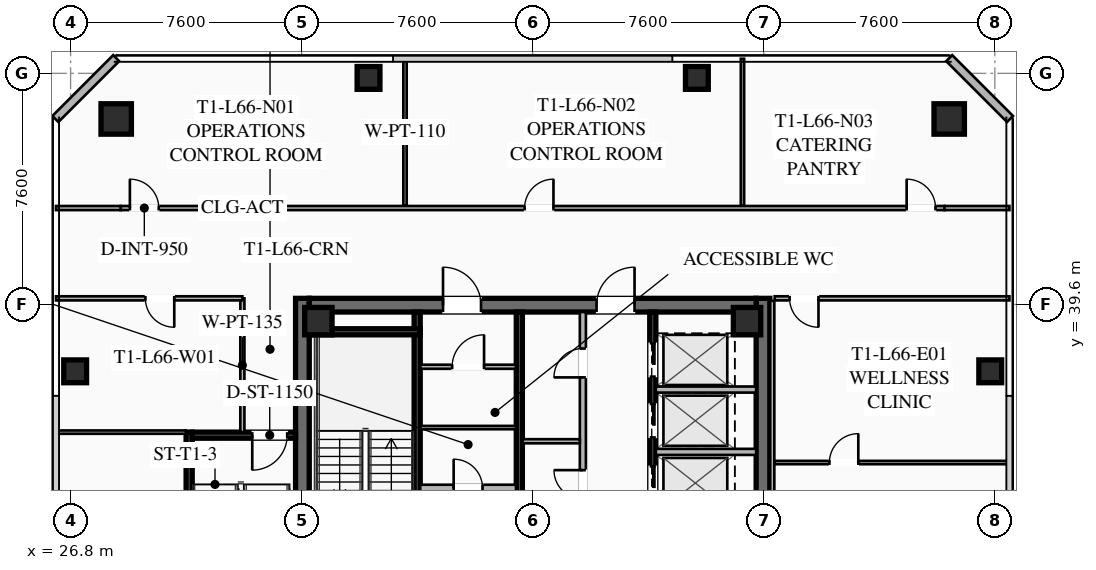
"""IFC4 building model, lengths in metres.
Left out: names, types, materials, properties, quantities, classifications, styles, units other than length and angle.
Written with IfcOpenShell. Run it as: python <this file> out.ifc"""

import sys

from ifc_helpers import new_model, si_unit, direction, frame, frame_2d, origin, origin_2d, place, context, subcontext, project, spatial, rectangle, hollow_rectangle, extrude, element, fill, save


model = new_model("IFC4")
c1 = context("Model", 3, precision=1e-05, world=origin(), true_north=direction((0.0, 1.0)))
c2 = subcontext(c1, "Body", "Model", "MODEL_VIEW")
j1 = project(units=[si_unit("LENGTHUNIT", "METRE"), si_unit("PLANEANGLEUNIT", "RADIAN")], contexts=[c1])
p1 = place(None, origin())
s1 = spatial("IfcSite", under=j1, at=p1, CompositionType="ELEMENT")
p2 = place(p1, origin())
s2 = spatial("IfcBuilding", under=s1, at=p2, CompositionType="ELEMENT")
p3 = place(p2, frame((0.0, 0.0, 243.25)))
s3 = spatial("IfcBuildingStorey", under=s2, at=p3, CompositionType="ELEMENT", Elevation=243.25)
for number, where, z_axis, x_axis in (
    (1, (34.425, 24.2, 0.0), (0.0, 0.0, 1.0), (0.0, 1.0, 0.0)),
    (2, (49.575, 39.8, 0.0), (0.0, 0.0, 1.0), (0.0, -1.0, 0.0)),
):
    element("IfcWall", number, at=place(p3, frame(where, z_axis=z_axis, x_axis=x_axis)), inside=s3, PredefinedType="SHEAR", context=c2, shape_type="SweptSolid", body=[
        extrude(rectangle(XDim=15.6, YDim=0.45, at=frame_2d((7.8, 0.0))), origin(), (0.0, 0.0, 1.0), 3.55),
    ])
p4 = place(p3, frame((34.65, 39.575, 0.0), z_axis=(0.0, 0.0, 1.0), x_axis=(1.0, 0.0, 0.0)))
e3 = element("IfcWall", 3, at=p4, inside=s3, PredefinedType="SHEAR", context=c2, shape_type="SweptSolid", body=[
    extrude(rectangle(XDim=14.7, YDim=0.45, at=frame_2d((7.35, 0.0))), origin(), (0.0, 0.0, 1.0), 3.55),
])
p5 = place(p4, frame((4.4, 0.0, 0.0)))
e4 = element("IfcOpeningElement", 4, at=p5, cuts=e3, PredefinedType="OPENING", context=c2, shape_type="SweptSolid", body=[
    extrude(rectangle(XDim=1.25, YDim=2.25, at=frame_2d((0.625, 1.125))), frame((0.0, 0.235, 0.0), z_axis=(0.0, -1.0, 0.0), x_axis=(1.0, 0.0, 0.0)), (0.0, 0.0, 1.0), 0.47),
])
p6 = place(p4, frame((9.45, 0.0, 0.0)))
e5 = element("IfcOpeningElement", 5, at=p6, cuts=e3, PredefinedType="OPENING", context=c2, shape_type="SweptSolid", body=[
    extrude(rectangle(XDim=1.25, YDim=2.25, at=frame_2d((0.625, 1.125))), frame((0.0, 0.235, 0.0), z_axis=(0.0, -1.0, 0.0), x_axis=(1.0, 0.0, 0.0)), (0.0, 0.0, 1.0), 0.47),
])
for number, where, z_axis, x_axis in (
    (6, (49.05, 39.05, 0.0), (0.0, 0.0, 1.0), (1.0, 0.0, 0.0)),
    (7, (34.95, 39.05, 0.0), (0.0, 0.0, 1.0), (1.0, 0.0, 0.0)),
):
    element("IfcColumn", number, at=place(p3, frame(where, z_axis=z_axis, x_axis=x_axis)), inside=s3, PredefinedType="COLUMN", context=c2, shape_type="SweptSolid", body=[
        extrude(hollow_rectangle(XDim=0.9, YDim=0.9, WallThickness=0.04, at=origin_2d()), origin(), (0.0, 0.0, 1.0), 3.25),
    ])
for number, where, z_axis, x_axis in (
    (8, (55.7, 45.7, 0.0), (0.0, 0.0, 1.0), (1.0, 0.0, 0.0)),
    (9, (28.3, 45.7, 0.0), (0.0, 0.0, 1.0), (1.0, 0.0, 0.0)),
):
    element("IfcColumn", number, at=place(p3, frame(where, z_axis=z_axis, x_axis=x_axis)), inside=s3, PredefinedType="COLUMN", context=c2, shape_type="SweptSolid", body=[
        extrude(hollow_rectangle(XDim=1.0, YDim=1.0, WallThickness=0.04, at=origin_2d()), origin(), (0.0, 0.0, 1.0), 3.25),
    ])
for number, where, z_axis, x_axis in (
    (10, (57.05, 37.4, 0.0), (0.0, 0.0, 1.0), (1.0, 0.0, 0.0)),
    (11, (47.4, 47.05, 0.0), (0.0, 0.0, 1.0), (1.0, 0.0, 0.0)),
    (12, (36.6, 47.05, 0.0), (0.0, 0.0, 1.0), (1.0, 0.0, 0.0)),
    (13, (26.95, 37.4, 0.0), (0.0, 0.0, 1.0), (1.0, 0.0, 0.0)),
):
    element("IfcColumn", number, at=place(p3, frame(where, z_axis=z_axis, x_axis=x_axis)), inside=s3, PredefinedType="COLUMN", context=c2, shape_type="SweptSolid", body=[
        extrude(hollow_rectangle(XDim=0.75, YDim=0.75, WallThickness=0.032, at=origin_2d()), origin(), (0.0, 0.0, 1.0), 3.25),
    ])
for number, where, z_axis, x_axis in (
    (14, (26.3, 45.7, 0.0), (0.0, 0.0, 1.0), (0.707, 0.707, 0.0)),
    (15, (55.7, 47.7, 0.0), (0.0, 0.0, 1.0), (0.707, -0.707, 0.0)),
):
    element("IfcWall", number, at=place(p3, frame(where, z_axis=z_axis, x_axis=x_axis)), inside=s3, PredefinedType="SOLIDWALL", context=c2, shape_type="SweptSolid", body=[
        extrude(rectangle(XDim=2.828, YDim=0.28, at=frame_2d((1.414, 0.0))), origin(), (0.0, 0.0, 1.0), 3.25),
    ])
p7 = place(p3, frame((38.2, 31.2, 0.0), z_axis=(0.0, 0.0, 1.0), x_axis=(0.0, 1.0, 0.0)))
e16 = element("IfcWall", 16, at=p7, inside=s3, PredefinedType="SHEAR", context=c2, shape_type="SweptSolid", body=[
    extrude(rectangle(XDim=8.15, YDim=0.2, at=frame_2d((4.075, 0.0))), origin(), (0.0, 0.0, 1.0), 3.25),
])
p8 = place(p7, frame((0.45, 0.0, 0.0)))
e17 = element("IfcOpeningElement", 17, at=p8, cuts=e16, PredefinedType="OPENING", context=c2, shape_type="SweptSolid", body=[
    extrude(rectangle(XDim=1.15, YDim=2.2, at=frame_2d((0.575, 1.1))), frame((0.0, 0.11, 0.0), z_axis=(0.0, -1.0, 0.0), x_axis=(1.0, 0.0, 0.0)), (0.0, 0.0, 1.0), 0.22),
])
p9 = place(p3, frame((34.65, 38.7, 0.0), z_axis=(0.0, 0.0, 1.0), x_axis=(1.0, 0.0, 0.0)))
e18 = element("IfcWall", 18, at=p9, inside=s3, PredefinedType="SHEAR", context=c2, shape_type="SweptSolid", body=[
    extrude(rectangle(XDim=3.65, YDim=0.2, at=frame_2d((1.825, 0.0))), origin(), (0.0, 0.0, 1.0), 3.25),
])
p10 = place(p3, frame((41.56, 24.65, 0.0), z_axis=(0.0, 0.0, 1.0), x_axis=(0.0, 1.0, 0.0)))
e19 = element("IfcWall", 19, at=p10, inside=s3, PredefinedType="SHEAR", context=c2, shape_type="SweptSolid", body=[
    extrude(rectangle(XDim=14.7, YDim=0.2, at=frame_2d((7.35, 0.0))), origin(), (0.0, 0.0, 1.0), 3.25),
])
p11 = place(p3, frame((38.3, 33.56, 0.0), z_axis=(0.0, 0.0, 1.0), x_axis=(1.0, 0.0, 0.0)))
e20 = element("IfcWall", 20, at=p11, inside=s3, PredefinedType="SOLIDWALL", context=c2, shape_type="SweptSolid", body=[
    extrude(rectangle(XDim=3.15, YDim=0.22, at=frame_2d((1.575, 0.0))), origin(), (0.0, 0.0, 1.0), 2.393),
])
p12 = place(p11, frame((1.1, 0.0, 0.0)))
e21 = element("IfcOpeningElement", 21, at=p12, cuts=e20, PredefinedType="OPENING", context=c2, shape_type="SweptSolid", body=[
    extrude(rectangle(XDim=0.95, YDim=2.05, at=frame_2d((0.475, 1.025))), frame((0.0, 0.12, 0.0), z_axis=(0.0, -1.0, 0.0), x_axis=(1.0, 0.0, 0.0)), (0.0, 0.0, 1.0), 0.24),
])
p13 = place(p3, frame((45.95, 39.35, 0.0), z_axis=(0.0, 0.0, 1.0), x_axis=(0.0, -1.0, 0.0)))
e22 = element("IfcWall", 22, at=p13, inside=s3, PredefinedType="SHEAR", context=c2, shape_type="SweptSolid", body=[
    extrude(rectangle(XDim=6.55, YDim=0.2, at=frame_2d((3.275, 0.0))), origin(), (0.0, 0.0, 1.0), 3.25),
])
p14 = place(p13, frame((5.075, 0.0, 0.0)))
e23 = element("IfcOpeningElement", 23, at=p14, cuts=e22, PredefinedType="OPENING", context=c2, shape_type="SweptSolid", body=[
    extrude(rectangle(XDim=1.1, YDim=2.2, at=frame_2d((0.55, 1.1))), frame((0.0, 0.11, 0.0), z_axis=(0.0, -1.0, 0.0), x_axis=(1.0, 0.0, 0.0)), (0.0, 0.0, 1.0), 0.22),
])
p15 = place(p13, frame((3.025, 0.0, 0.0)))
e24 = element("IfcOpeningElement", 24, at=p15, cuts=e22, PredefinedType="OPENING", context=c2, shape_type="SweptSolid", body=[
    extrude(rectangle(XDim=1.1, YDim=2.2, at=frame_2d((0.55, 1.1))), frame((0.0, 0.11, 0.0), z_axis=(0.0, -1.0, 0.0), x_axis=(1.0, 0.0, 0.0)), (0.0, 0.0, 1.0), 0.22),
])
p16 = place(p13, frame((1.025, 0.0, 0.0)))
e25 = element("IfcOpeningElement", 25, at=p16, cuts=e22, PredefinedType="OPENING", context=c2, shape_type="SweptSolid", body=[
    extrude(rectangle(XDim=1.1, YDim=2.2, at=frame_2d((0.55, 1.1))), frame((0.0, 0.11, 0.0), z_axis=(0.0, -1.0, 0.0), x_axis=(1.0, 0.0, 0.0)), (0.0, 0.0, 1.0), 0.22),
])
for number, where, z_axis, x_axis in (
    (26, (46.05, 34.75, 0.0), (0.0, 0.0, 1.0), (1.0, 0.0, 0.0)),
    (27, (46.05, 36.8, 0.0), (0.0, 0.0, 1.0), (1.0, 0.0, 0.0)),
):
    element("IfcWall", number, at=place(p3, frame(where, z_axis=z_axis, x_axis=x_axis)), inside=s3, PredefinedType="SOLIDWALL", context=c2, shape_type="SweptSolid", body=[
        extrude(rectangle(XDim=3.3, YDim=0.2, at=frame_2d((1.65, 0.0))), origin(), (0.0, 0.0, 1.0), 3.25),
    ])
p17 = place(p3, frame((38.3, 37.55, 0.0), z_axis=(0.0, 0.0, 1.0), x_axis=(1.0, 0.0, 0.0)))
e28 = element("IfcWall", 28, at=p17, inside=s3, PredefinedType="PARTITIONING", context=c2, shape_type="SweptSolid", body=[
    extrude(rectangle(XDim=3.15, YDim=0.135, at=frame_2d((1.575, 0.0))), origin(), (0.0, 0.0, 1.0), 2.393),
])
p18 = place(p17, frame((1.05, 0.0, 0.0)))
e29 = element("IfcOpeningElement", 29, at=p18, cuts=e28, PredefinedType="OPENING", context=c2, shape_type="SweptSolid", body=[
    extrude(rectangle(XDim=1.05, YDim=2.2, at=frame_2d((0.525, 1.1))), frame((0.0, 0.077, 0.0), z_axis=(0.0, -1.0, 0.0), x_axis=(1.0, 0.0, 0.0)), (0.0, 0.0, 1.0), 0.155),
])
p19 = place(p3, frame((38.3, 35.55, 0.0), z_axis=(0.0, 0.0, 1.0), x_axis=(1.0, 0.0, 0.0)))
e30 = element("IfcWall", 30, at=p19, inside=s3, PredefinedType="PARTITIONING", context=c2, shape_type="SweptSolid", body=[
    extrude(rectangle(XDim=3.15, YDim=0.11, at=frame_2d((1.575, 0.0))), origin(), (0.0, 0.0, 1.0), 2.393),
])
p20 = place(p3, frame((43.65, 32.35, 0.0), z_axis=(0.0, 0.0, 1.0), x_axis=(0.0, 1.0, 0.0)))
e31 = element("IfcWall", 31, at=p20, inside=s3, PredefinedType="SOLIDWALL", context=c2, shape_type="SweptSolid", body=[
    extrude(rectangle(XDim=7.0, YDim=0.2, at=frame_2d((3.5, 0.0))), origin(), (0.0, 0.0, 1.0), 2.393),
])
p21 = place(p20, frame((0.85, 0.0, 0.0)))
e32 = element("IfcOpeningElement", 32, at=p21, cuts=e31, PredefinedType="OPENING", context=c2, shape_type="SweptSolid", body=[
    extrude(rectangle(XDim=0.95, YDim=2.05, at=frame_2d((0.475, 1.025))), frame((0.0, 0.11, 0.0), z_axis=(0.0, -1.0, 0.0), x_axis=(1.0, 0.0, 0.0)), (0.0, 0.0, 1.0), 0.22),
])
p22 = place(p20, frame((4.85, 0.0, 0.0)))
e33 = element("IfcOpeningElement", 33, at=p22, cuts=e31, PredefinedType="OPENING", context=c2, shape_type="SweptSolid", body=[
    extrude(rectangle(XDim=0.95, YDim=2.05, at=frame_2d((0.475, 1.025))), frame((0.0, 0.11, 0.0), z_axis=(0.0, -1.0, 0.0), x_axis=(1.0, 0.0, 0.0)), (0.0, 0.0, 1.0), 0.22),
])
p23 = place(p3, frame((41.67, 35.1, 0.0), z_axis=(0.0, 0.0, 1.0), x_axis=(1.0, 0.0, 0.0)))
e34 = element("IfcWall", 34, at=p23, inside=s3, PredefinedType="PARTITIONING", context=c2, shape_type="SweptSolid", body=[
    extrude(rectangle(XDim=1.88, YDim=0.135, at=frame_2d((0.94, 0.0))), origin(), (0.0, 0.0, 1.0), 2.393),
])
p24 = place(p3, frame((30.7, 28.6, 0.0), z_axis=(0.0, 0.0, 1.0), x_axis=(0.0, 1.0, 0.0)))
e35 = element("IfcWall", 35, at=p24, inside=s3, PredefinedType="SHEAR", context=c2, shape_type="SweptSolid", body=[
    extrude(rectangle(XDim=6.8, YDim=0.2, at=frame_2d((3.4, 0.0))), origin(), (0.0, 0.0, 1.0), 3.25),
])
p25 = place(p3, frame((34.2, 35.3, 0.0), z_axis=(0.0, 0.0, 1.0), x_axis=(-1.0, 0.0, 0.0)))
e36 = element("IfcWall", 36, at=p25, inside=s3, PredefinedType="SHEAR", context=c2, shape_type="SweptSolid", body=[
    extrude(rectangle(XDim=3.4, YDim=0.2, at=frame_2d((1.7, 0.0))), origin(), (0.0, 0.0, 1.0), 3.25),
])
p26 = place(p25, frame((0.275, 0.0, 0.0)))
e37 = element("IfcOpeningElement", 37, at=p26, cuts=e36, PredefinedType="OPENING", context=c2, shape_type="SweptSolid", body=[
    extrude(rectangle(XDim=1.15, YDim=2.2, at=frame_2d((0.575, 1.1))), frame((0.0, 0.11, 0.0), z_axis=(0.0, -1.0, 0.0), x_axis=(1.0, 0.0, 0.0)), (0.0, 0.0, 1.0), 0.22),
])
p27 = place(p3, frame((32.45, 35.4, 0.0), z_axis=(0.0, 0.0, 1.0), x_axis=(0.0, 1.0, 0.0)))
e38 = element("IfcWall", 38, at=p27, inside=s3, PredefinedType="PARTITIONING", context=c2, shape_type="SweptSolid", body=[
    extrude(rectangle(XDim=4.4, YDim=0.135, at=frame_2d((2.2, 0.0))), origin(), (0.0, 0.0, 1.0), 2.393),
])
p28 = place(p3, frame((28.45, 42.77, 0.0), z_axis=(0.0, 0.0, 1.0), x_axis=(1.0, 0.0, 0.0)))
e39 = element("IfcWall", 39, at=p28, inside=s3, PredefinedType="PARTITIONING", context=c2, shape_type="SweptSolid", body=[
    extrude(rectangle(XDim=27.1, YDim=0.135, at=frame_2d((13.55, 0.0))), origin(), (0.0, 0.0, 1.0), 2.393),
])
p29 = place(p28, frame((0.3, 0.0, 0.0)))
e40 = element("IfcOpeningElement", 40, at=p29, cuts=e39, PredefinedType="OPENING", context=c2, shape_type="SweptSolid", body=[
    extrude(rectangle(XDim=0.95, YDim=2.05, at=frame_2d((0.475, 1.025))), frame((0.0, 0.077, 0.0), z_axis=(0.0, -1.0, 0.0), x_axis=(1.0, 0.0, 0.0)), (0.0, 0.0, 1.0), 0.155),
])
p30 = place(p28, frame((13.283, 0.0, 0.0)))
e41 = element("IfcOpeningElement", 41, at=p30, cuts=e39, PredefinedType="OPENING", context=c2, shape_type="SweptSolid", body=[
    extrude(rectangle(XDim=0.95, YDim=2.05, at=frame_2d((0.475, 1.025))), frame((0.0, 0.077, 0.0), z_axis=(0.0, -1.0, 0.0), x_axis=(1.0, 0.0, 0.0)), (0.0, 0.0, 1.0), 0.155),
])
p31 = place(p28, frame((25.85, 0.0, 0.0)))
e42 = element("IfcOpeningElement", 42, at=p31, cuts=e39, PredefinedType="OPENING", context=c2, shape_type="SweptSolid", body=[
    extrude(rectangle(XDim=0.95, YDim=2.05, at=frame_2d((0.475, 1.025))), frame((0.0, 0.077, 0.0), z_axis=(0.0, -1.0, 0.0), x_axis=(1.0, 0.0, 0.0)), (0.0, 0.0, 1.0), 0.155),
])
for number, where, z_axis, x_axis in (
    (43, (26.32, 42.77, 0.0), (0.0, 0.0, 1.0), (1.0, 0.0, 0.0)),
    (44, (55.55, 42.77, 0.0), (0.0, 0.0, 1.0), (1.0, 0.0, 0.0)),
):
    element("IfcWall", number, at=place(p3, frame(where, z_axis=z_axis, x_axis=x_axis)), inside=s3, PredefinedType="PARTITIONING", context=c2, shape_type="SweptSolid", body=[
        extrude(rectangle(XDim=2.13, YDim=0.135, at=frame_2d((1.065, 0.0))), origin(), (0.0, 0.0, 1.0), 2.393),
    ])
for number, where, z_axis, x_axis in (
    (45, (37.8, 42.85, 0.0), (0.0, 0.0, 1.0), (0.0, 1.0, 0.0)),
    (46, (48.9, 42.85, 0.0), (0.0, 0.0, 1.0), (0.0, 1.0, 0.0)),
):
    element("IfcWall", number, at=place(p3, frame(where, z_axis=z_axis, x_axis=x_axis)), inside=s3, PredefinedType="PARTITIONING", context=c2, shape_type="SweptSolid", body=[
        extrude(rectangle(XDim=4.83, YDim=0.11, at=frame_2d((2.415, 0.0))), origin(), (0.0, 0.0, 1.0), 2.393),
    ])
p32 = place(p3, frame((49.88, 39.72, 0.0), z_axis=(0.0, 0.0, 1.0), x_axis=(0.0, -1.0, 0.0)))
e47 = element("IfcWall", 47, at=p32, inside=s3, PredefinedType="PARTITIONING", context=c2, shape_type="SweptSolid", body=[
    extrude(rectangle(XDim=15.44, YDim=0.135, at=frame_2d((7.72, 0.0))), origin(), (0.0, 0.0, 1.0), 2.393),
])
p33 = place(p3, frame((57.68, 39.8, 0.0), z_axis=(0.0, 0.0, 1.0), x_axis=(-1.0, 0.0, 0.0)))
e48 = element("IfcWall", 48, at=p33, inside=s3, PredefinedType="PARTITIONING", context=c2, shape_type="SweptSolid", body=[
    extrude(rectangle(XDim=7.72, YDim=0.135, at=frame_2d((3.86, 0.0))), origin(), (0.0, 0.0, 1.0), 2.393),
])
p34 = place(p33, frame((6.28, 0.0, 0.0)))
e49 = element("IfcOpeningElement", 49, at=p34, cuts=e48, PredefinedType="OPENING", context=c2, shape_type="SweptSolid", body=[
    extrude(rectangle(XDim=0.95, YDim=2.05, at=frame_2d((0.475, 1.025))), frame((0.0, 0.077, 0.0), z_axis=(0.0, -1.0, 0.0), x_axis=(1.0, 0.0, 0.0)), (0.0, 0.0, 1.0), 0.155),
])
p35 = place(p3, frame((49.96, 34.4, 0.0), z_axis=(0.0, 0.0, 1.0), x_axis=(1.0, 0.0, 0.0)))
e50 = element("IfcWall", 50, at=p35, inside=s3, PredefinedType="PARTITIONING", context=c2, shape_type="SweptSolid", body=[
    extrude(rectangle(XDim=7.72, YDim=0.11, at=frame_2d((3.86, 0.0))), origin(), (0.0, 0.0, 1.0), 2.393),
])
p36 = place(p35, frame((1.8, 0.0, 0.0)))
e51 = element("IfcOpeningElement", 51, at=p36, cuts=e50, PredefinedType="OPENING", context=c2, shape_type="SweptSolid", body=[
    extrude(rectangle(XDim=0.95, YDim=2.05, at=frame_2d((0.475, 1.025))), frame((0.0, 0.065, 0.0), z_axis=(0.0, -1.0, 0.0), x_axis=(1.0, 0.0, 0.0)), (0.0, 0.0, 1.0), 0.13),
])
p37 = place(p3, frame((32.45, 39.8, 0.0), z_axis=(0.0, 0.0, 1.0), x_axis=(-1.0, 0.0, 0.0)))
e52 = element("IfcWall", 52, at=p37, inside=s3, PredefinedType="PARTITIONING", context=c2, shape_type="SweptSolid", body=[
    extrude(rectangle(XDim=6.13, YDim=0.135, at=frame_2d((3.065, 0.0))), origin(), (0.0, 0.0, 1.0), 2.393),
])
p38 = place(p37, frame((2.24, 0.0, 0.0)))
e53 = element("IfcOpeningElement", 53, at=p38, cuts=e52, PredefinedType="OPENING", context=c2, shape_type="SweptSolid", body=[
    extrude(rectangle(XDim=0.95, YDim=2.05, at=frame_2d((0.475, 1.025))), frame((0.0, 0.077, 0.0), z_axis=(0.0, -1.0, 0.0), x_axis=(1.0, 0.0, 0.0)), (0.0, 0.0, 1.0), 0.155),
])
p39 = place(p3, frame((30.6, 35.4, 0.0), z_axis=(0.0, 0.0, 1.0), x_axis=(-1.0, 0.0, 0.0)))
e54 = element("IfcWall", 54, at=p39, inside=s3, PredefinedType="PARTITIONING", context=c2, shape_type="SweptSolid", body=[
    extrude(rectangle(XDim=4.28, YDim=0.11, at=frame_2d((2.14, 0.0))), origin(), (0.0, 0.0, 1.0), 2.393),
])
p40 = place(p5, origin())
e55 = element("IfcDoor", 55, at=p40, inside=s3, OperationType="SINGLE_SWING_LEFT", PredefinedType="DOOR", context=c2, shape_type="SweptSolid", body=[
    extrude(rectangle(XDim=1.25, YDim=2.25, at=frame_2d((0.625, 1.125))), frame((0.0, 0.025, 0.0), z_axis=(0.0, -1.0, 0.0), x_axis=(1.0, 0.0, 0.0)), (0.0, 0.0, 1.0), 0.05),
])
fill(e4, e55)
p41 = place(p6, origin())
e56 = element("IfcDoor", 56, at=p41, inside=s3, OperationType="SINGLE_SWING_RIGHT", PredefinedType="DOOR", context=c2, shape_type="SweptSolid", body=[
    extrude(rectangle(XDim=1.25, YDim=2.25, at=frame_2d((0.625, 1.125))), frame((0.0, 0.025, 0.0), z_axis=(0.0, -1.0, 0.0), x_axis=(1.0, 0.0, 0.0)), (0.0, 0.0, 1.0), 0.05),
])
fill(e5, e56)
p42 = place(p18, origin())
e57 = element("IfcDoor", 57, at=p42, inside=s3, OperationType="SINGLE_SWING_RIGHT", PredefinedType="DOOR", context=c2, shape_type="SweptSolid", body=[
    extrude(rectangle(XDim=1.05, YDim=2.2, at=frame_2d((0.525, 1.1))), frame((0.0, 0.025, 0.0), z_axis=(0.0, -1.0, 0.0), x_axis=(1.0, 0.0, 0.0)), (0.0, 0.0, 1.0), 0.05),
])
fill(e29, e57)
p43 = place(p12, origin())
e58 = element("IfcDoor", 58, at=p43, inside=s3, OperationType="SINGLE_SWING_LEFT", PredefinedType="DOOR", context=c2, shape_type="SweptSolid", body=[
    extrude(rectangle(XDim=0.95, YDim=2.05, at=frame_2d((0.475, 1.025))), frame((0.0, 0.025, 0.0), z_axis=(0.0, -1.0, 0.0), x_axis=(1.0, 0.0, 0.0)), (0.0, 0.0, 1.0), 0.05),
])
fill(e21, e58)
p44 = place(p21, origin())
e59 = element("IfcDoor", 59, at=p44, inside=s3, OperationType="SINGLE_SWING_RIGHT", PredefinedType="DOOR", context=c2, shape_type="SweptSolid", body=[
    extrude(rectangle(XDim=0.95, YDim=2.05, at=frame_2d((0.475, 1.025))), frame((0.0, 0.025, 0.0), z_axis=(0.0, -1.0, 0.0), x_axis=(1.0, 0.0, 0.0)), (0.0, 0.0, 1.0), 0.05),
])
fill(e32, e59)
p45 = place(p22, origin())
e60 = element("IfcDoor", 60, at=p45, inside=s3, OperationType="SINGLE_SWING_LEFT", PredefinedType="DOOR", context=c2, shape_type="SweptSolid", body=[
    extrude(rectangle(XDim=0.95, YDim=2.05, at=frame_2d((0.475, 1.025))), frame((0.0, 0.025, 0.0), z_axis=(0.0, -1.0, 0.0), x_axis=(1.0, 0.0, 0.0)), (0.0, 0.0, 1.0), 0.05),
])
fill(e33, e60)
p46 = place(p26, origin())
e61 = element("IfcDoor", 61, at=p46, inside=s3, OperationType="SINGLE_SWING_RIGHT", PredefinedType="DOOR", context=c2, shape_type="SweptSolid", body=[
    extrude(rectangle(XDim=1.15, YDim=2.2, at=frame_2d((0.575, 1.1))), frame((0.0, 0.025, 0.0), z_axis=(0.0, -1.0, 0.0), x_axis=(1.0, 0.0, 0.0)), (0.0, 0.0, 1.0), 0.05),
])
fill(e37, e61)
p47 = place(p29, origin())
e62 = element("IfcDoor", 62, at=p47, inside=s3, OperationType="SINGLE_SWING_LEFT", PredefinedType="DOOR", context=c2, shape_type="SweptSolid", body=[
    extrude(rectangle(XDim=0.95, YDim=2.05, at=frame_2d((0.475, 1.025))), frame((0.0, 0.025, 0.0), z_axis=(0.0, -1.0, 0.0), x_axis=(1.0, 0.0, 0.0)), (0.0, 0.0, 1.0), 0.05),
])
fill(e40, e62)
p48 = place(p30, origin())
e63 = element("IfcDoor", 63, at=p48, inside=s3, OperationType="SINGLE_SWING_RIGHT", PredefinedType="DOOR", context=c2, shape_type="SweptSolid", body=[
    extrude(rectangle(XDim=0.95, YDim=2.05, at=frame_2d((0.475, 1.025))), frame((0.0, 0.025, 0.0), z_axis=(0.0, -1.0, 0.0), x_axis=(1.0, 0.0, 0.0)), (0.0, 0.0, 1.0), 0.05),
])
fill(e41, e63)
p49 = place(p31, origin())
e64 = element("IfcDoor", 64, at=p49, inside=s3, OperationType="SINGLE_SWING_LEFT", PredefinedType="DOOR", context=c2, shape_type="SweptSolid", body=[
    extrude(rectangle(XDim=0.95, YDim=2.05, at=frame_2d((0.475, 1.025))), frame((0.0, 0.025, 0.0), z_axis=(0.0, -1.0, 0.0), x_axis=(1.0, 0.0, 0.0)), (0.0, 0.0, 1.0), 0.05),
])
fill(e42, e64)
p50 = place(p34, origin())
e65 = element("IfcDoor", 65, at=p50, inside=s3, OperationType="SINGLE_SWING_LEFT", PredefinedType="DOOR", context=c2, shape_type="SweptSolid", body=[
    extrude(rectangle(XDim=0.95, YDim=2.05, at=frame_2d((0.475, 1.025))), frame((0.0, 0.025, 0.0), z_axis=(0.0, -1.0, 0.0), x_axis=(1.0, 0.0, 0.0)), (0.0, 0.0, 1.0), 0.05),
])
fill(e49, e65)
p51 = place(p36, origin())
e66 = element("IfcDoor", 66, at=p51, inside=s3, OperationType="SINGLE_SWING_RIGHT", PredefinedType="DOOR", context=c2, shape_type="SweptSolid", body=[
    extrude(rectangle(XDim=0.95, YDim=2.05, at=frame_2d((0.475, 1.025))), frame((0.0, 0.025, 0.0), z_axis=(0.0, -1.0, 0.0), x_axis=(1.0, 0.0, 0.0)), (0.0, 0.0, 1.0), 0.05),
])
fill(e51, e66)
p52 = place(p38, origin())
e67 = element("IfcDoor", 67, at=p52, inside=s3, OperationType="SINGLE_SWING_LEFT", PredefinedType="DOOR", context=c2, shape_type="SweptSolid", body=[
    extrude(rectangle(XDim=0.95, YDim=2.05, at=frame_2d((0.475, 1.025))), frame((0.0, 0.025, 0.0), z_axis=(0.0, -1.0, 0.0), x_axis=(1.0, 0.0, 0.0)), (0.0, 0.0, 1.0), 0.05),
])
fill(e53, e67)
p53 = place(p14, origin())
e68 = element("IfcDoor", 68, at=p53, inside=s3, OperationType="SLIDING_TO_LEFT", PredefinedType="DOOR", context=c2, shape_type="SweptSolid", body=[
    extrude(rectangle(XDim=1.1, YDim=2.2, at=frame_2d((0.55, 1.1))), frame((0.0, 0.025, 0.0), z_axis=(0.0, -1.0, 0.0), x_axis=(1.0, 0.0, 0.0)), (0.0, 0.0, 1.0), 0.05),
])
fill(e23, e68)
p54 = place(p15, origin())
e69 = element("IfcDoor", 69, at=p54, inside=s3, OperationType="SLIDING_TO_LEFT", PredefinedType="DOOR", context=c2, shape_type="SweptSolid", body=[
    extrude(rectangle(XDim=1.1, YDim=2.2, at=frame_2d((0.55, 1.1))), frame((0.0, 0.025, 0.0), z_axis=(0.0, -1.0, 0.0), x_axis=(1.0, 0.0, 0.0)), (0.0, 0.0, 1.0), 0.05),
])
fill(e24, e69)
p55 = place(p16, origin())
e70 = element("IfcDoor", 70, at=p55, inside=s3, OperationType="SLIDING_TO_LEFT", PredefinedType="DOOR", context=c2, shape_type="SweptSolid", body=[
    extrude(rectangle(XDim=1.1, YDim=2.2, at=frame_2d((0.55, 1.1))), frame((0.0, 0.025, 0.0), z_axis=(0.0, -1.0, 0.0), x_axis=(1.0, 0.0, 0.0)), (0.0, 0.0, 1.0), 0.05),
])
fill(e25, e70)
save(model, sys.argv[1])
